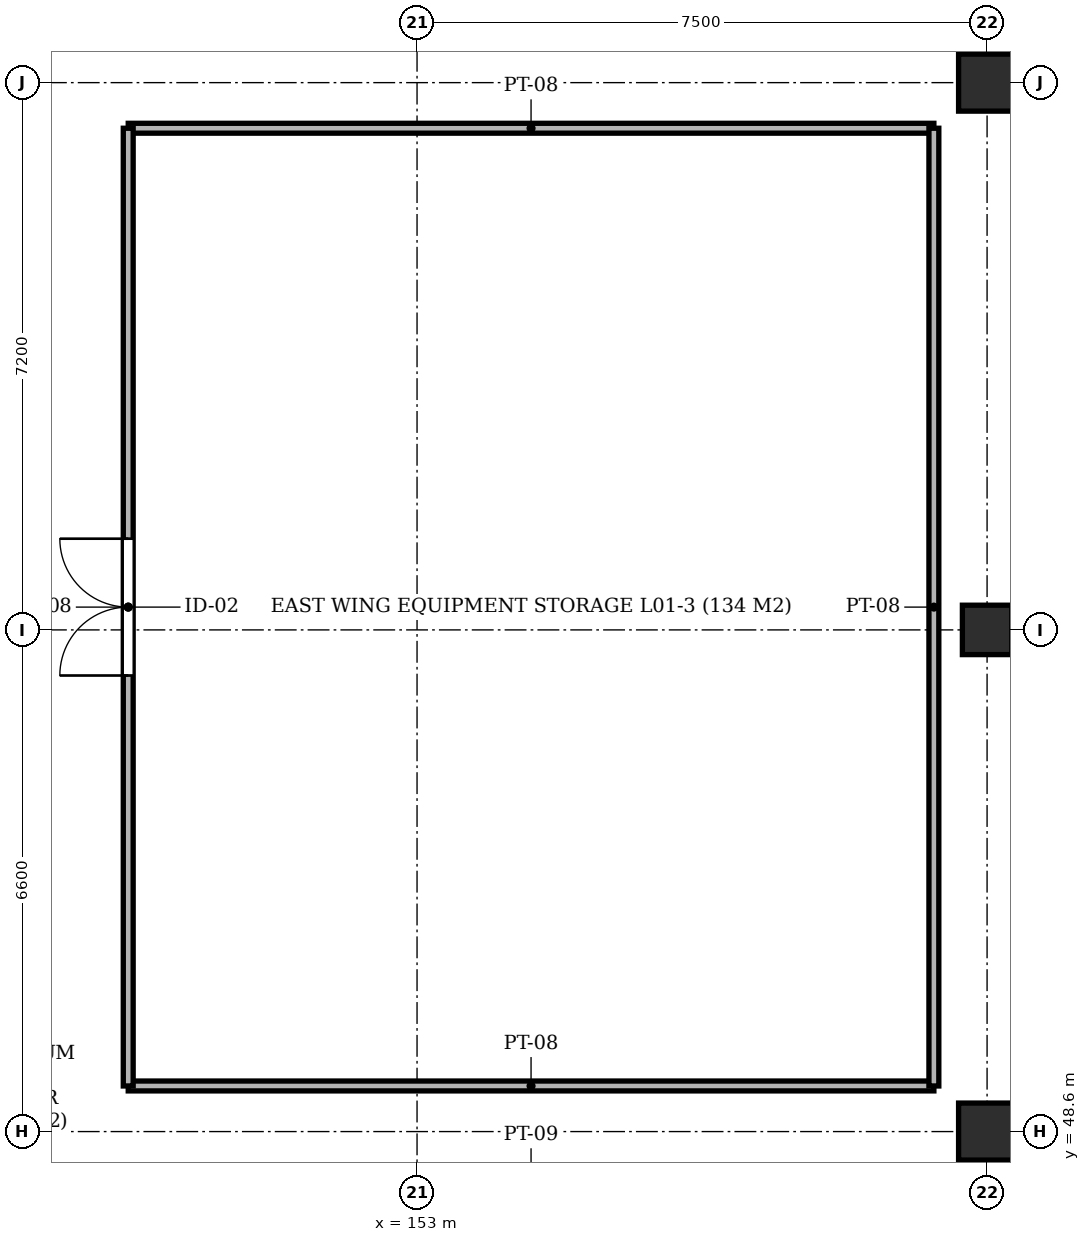
"""IFC4 building model, lengths in metres.
Left out: names, types, materials, properties, quantities, classifications, styles, units other than length and angle.
Written with IfcOpenShell. Run it as: python <this file> out.ifc"""

import sys

from ifc_helpers import new_model, si_unit, direction, frame, frame_2d, origin, origin_2d, place, context, subcontext, project, spatial, rectangle, extrude, element, fill, save


model = new_model("IFC4")
c1 = context("Model", 3, precision=1e-05, world=origin(), true_north=direction((0.0, 1.0)))
c2 = subcontext(c1, "Body", "Model", "MODEL_VIEW")
j1 = project(units=[si_unit("LENGTHUNIT", "METRE"), si_unit("PLANEANGLEUNIT", "RADIAN")], contexts=[c1])
p1 = place(None, origin())
s1 = spatial("IfcSite", under=j1, at=p1, CompositionType="ELEMENT")
p2 = place(p1, origin())
s2 = spatial("IfcBuilding", under=s1, at=p2, CompositionType="ELEMENT")
p3 = place(p2, frame((0.0, 0.0, 4.6)))
s3 = spatial("IfcBuildingStorey", under=s2, at=p3, CompositionType="ELEMENT", Elevation=4.6)
p4 = place(p3, frame((160.5, 48.6, -0.3), z_axis=(0.0, 0.0, 1.0), x_axis=(1.0, 0.0, 0.0)))
e1 = element("IfcColumn", 1, at=p4, inside=s3, PredefinedType="COLUMN", context=c2, shape_type="SweptSolid", body=[
    extrude(rectangle(XDim=0.75, YDim=0.75, at=origin_2d()), origin(), (0.0, 0.0, 1.0), 4.65),
])
p5 = place(p3, frame((160.5, 55.2, -0.3), z_axis=(0.0, 0.0, 1.0), x_axis=(1.0, 0.0, 0.0)))
e2 = element("IfcColumn", 2, at=p5, inside=s3, PredefinedType="COLUMN", context=c2, shape_type="SweptSolid", body=[
    extrude(rectangle(XDim=0.65, YDim=0.65, at=origin_2d()), origin(), (0.0, 0.0, 1.0), 4.65),
])
p6 = place(p3, frame((160.5, 62.4, -0.3), z_axis=(0.0, 0.0, 1.0), x_axis=(1.0, 0.0, 0.0)))
e3 = element("IfcColumn", 3, at=p6, inside=s3, PredefinedType="COLUMN", context=c2, shape_type="SweptSolid", body=[
    extrude(rectangle(XDim=0.75, YDim=0.75, at=origin_2d()), origin(), (0.0, 0.0, 1.0), 4.65),
])
for number, where, z_axis, x_axis in (
    (4, (149.2, 49.2, 0.0), (0.0, 0.0, 1.0), (1.0, 0.0, 0.0)),
    (5, (149.2, 61.8, 0.0), (0.0, 0.0, 1.0), (1.0, 0.0, 0.0)),
):
    element("IfcWall", number, at=place(p3, frame(where, z_axis=z_axis, x_axis=x_axis)), inside=s3, PredefinedType="PARTITIONING", context=c2, shape_type="SweptSolid", body=[
        extrude(rectangle(XDim=10.6, YDim=0.13, at=frame_2d((5.3, 0.0))), origin(), (0.0, 0.0, 1.0), 4.08),
    ])
p7 = place(p3, frame((149.2, 49.2, 0.0), z_axis=(0.0, 0.0, 1.0), x_axis=(0.0, 1.0, 0.0)))
e6 = element("IfcWall", 6, at=p7, inside=s3, PredefinedType="PARTITIONING", context=c2, shape_type="SweptSolid", body=[
    extrude(rectangle(XDim=12.6, YDim=0.13, at=frame_2d((6.3, 0.0))), origin(), (0.0, 0.0, 1.0), 4.08),
])
p8 = place(p7, frame((5.4, 0.0, 0.0)))
e7 = element("IfcOpeningElement", 7, at=p8, cuts=e6, PredefinedType="OPENING", context=c2, shape_type="SweptSolid", body=[
    extrude(rectangle(XDim=1.8, YDim=2.25, at=frame_2d((0.9, 1.125))), frame((0.0, 0.077, 0.0), z_axis=(0.0, -1.0, 0.0), x_axis=(1.0, 0.0, 0.0)), (0.0, 0.0, 1.0), 0.154),
])
p9 = place(p3, frame((159.8, 49.2, 0.0), z_axis=(0.0, 0.0, 1.0), x_axis=(0.0, 1.0, 0.0)))
e8 = element("IfcWall", 8, at=p9, inside=s3, PredefinedType="PARTITIONING", context=c2, shape_type="SweptSolid", body=[
    extrude(rectangle(XDim=12.6, YDim=0.13, at=frame_2d((6.3, 0.0))), origin(), (0.0, 0.0, 1.0), 4.08),
])
p10 = place(p8, origin())
e9 = element("IfcDoor", 9, at=p10, inside=s3, OperationType="DOUBLE_DOOR_SINGLE_SWING", PredefinedType="DOOR", context=c2, shape_type="SweptSolid", body=[
    extrude(rectangle(XDim=1.8, YDim=2.25, at=frame_2d((0.9, 1.125))), frame((0.0, 0.025, 0.0), z_axis=(0.0, -1.0, 0.0), x_axis=(1.0, 0.0, 0.0)), (0.0, 0.0, 1.0), 0.05),
])
fill(e7, e9)
save(model, sys.argv[1])
